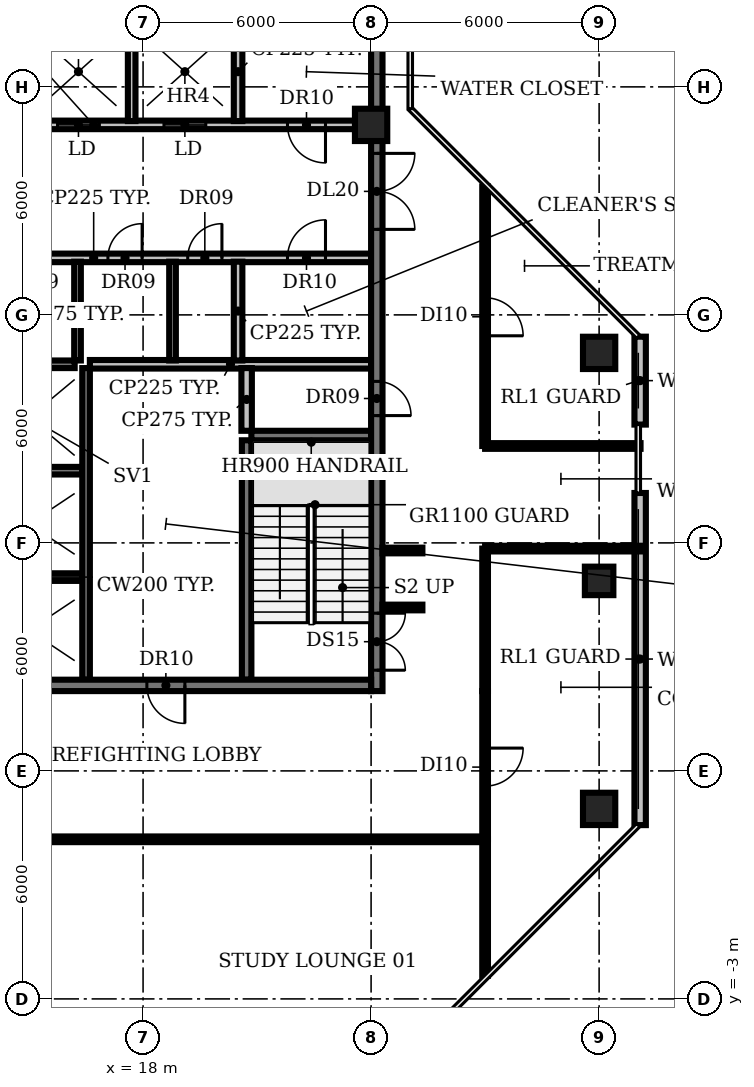
"""IFC4 building model, lengths in metres.
Left out: names, types, materials, properties, quantities, classifications, styles, units other than length and angle.
Written with IfcOpenShell. Run it as: python <this file> out.ifc"""

import sys

from ifc_helpers import new_model, si_unit, direction, frame, frame_2d, origin, origin_2d, place, context, subcontext, project, spatial, rectangle, circle, extrude, element, fill, save


model = new_model("IFC4")
c1 = context("Model", 3, precision=1e-05, world=origin(), true_north=direction((0.0, 1.0)))
c2 = subcontext(c1, "Body", "Model", "MODEL_VIEW")
j1 = project(units=[si_unit("LENGTHUNIT", "METRE"), si_unit("PLANEANGLEUNIT", "RADIAN")], contexts=[c1])
p1 = place(None, origin())
s1 = spatial("IfcSite", under=j1, at=p1, CompositionType="ELEMENT")
p2 = place(p1, origin())
s2 = spatial("IfcBuilding", under=s1, at=p2, CompositionType="ELEMENT")
p3 = place(p2, frame((0.0, 0.0, 281.0)))
s3 = spatial("IfcBuildingStorey", under=s2, at=p3, CompositionType="ELEMENT", Elevation=281.0)
for number, where, z_axis, x_axis in (
    (1, (24.0, 20.0, 0.0), (0.0, 0.0, 1.0), (1.0, 0.0, 0.0)),
    (2, (30.0, 2.0, 0.0), (0.0, 0.0, 1.0), (1.0, 0.0, 0.0)),
):
    element("IfcColumn", number, at=place(p3, frame(where, z_axis=z_axis, x_axis=x_axis)), inside=s3, PredefinedType="COLUMN", context=c2, shape_type="SweptSolid", body=[
        extrude(circle(Radius=0.425, at=origin_2d()), origin(), (0.0, 0.0, 1.0), 3.85),
    ])
p4 = place(p3, frame((30.0, 8.0, 0.0), z_axis=(0.0, 0.0, 1.0), x_axis=(1.0, 0.0, 0.0)))
e3 = element("IfcColumn", 3, at=p4, inside=s3, PredefinedType="COLUMN", context=c2, shape_type="SweptSolid", body=[
    extrude(rectangle(XDim=0.75, YDim=0.75, at=origin_2d()), origin(), (0.0, 0.0, 1.0), 3.85),
])
p5 = place(p3, frame((30.0, 14.0, 0.0), z_axis=(0.0, 0.0, 1.0), x_axis=(1.0, 0.0, 0.0)))
e4 = element("IfcColumn", 4, at=p5, inside=s3, PredefinedType="COLUMN", context=c2, shape_type="SweptSolid", body=[
    extrude(circle(Radius=0.425, at=origin_2d()), origin(), (0.0, 0.0, 1.0), 3.85),
])
p6 = place(p3, frame((31.08, 1.573, 0.0), z_axis=(0.0, 0.0, 1.0), x_axis=(0.0, 1.0, 0.0)))
e5 = element("IfcWall", 5, at=p6, inside=s3, PredefinedType="SOLIDWALL", context=c2, shape_type="SweptSolid", body=[
    extrude(rectangle(XDim=8.74, YDim=0.3, at=frame_2d((4.37, 0.0))), origin(), (0.0, 0.0, 1.0), 3.85),
])
p7 = place(p3, frame((31.08, 12.113, 0.0), z_axis=(0.0, 0.0, 1.0), x_axis=(0.0, 1.0, 0.0)))
e6 = element("IfcWall", 6, at=p7, inside=s3, PredefinedType="SOLIDWALL", context=c2, shape_type="SweptSolid", body=[
    extrude(rectangle(XDim=2.313, YDim=0.3, at=frame_2d((1.157, 0.0))), origin(), (0.0, 0.0, 1.0), 3.85),
])
for number, where, z_axis, x_axis in (
    (7, (13.6, 8.1, 0.0), (0.0, 0.0, 1.0), (1.0, 0.0, 0.0)),
    (8, (13.6, 10.9, 0.0), (0.0, 0.0, 1.0), (1.0, 0.0, 0.0)),
):
    element("IfcWall", number, at=place(p3, frame(where, z_axis=z_axis, x_axis=x_axis)), inside=s3, PredefinedType="SHEAR", context=c2, shape_type="SweptSolid", body=[
        extrude(rectangle(XDim=2.8, YDim=0.2, at=frame_2d((1.4, 0.0))), origin(), (0.0, 0.0, 1.0), 3.85),
    ])
p8 = place(p3, frame((20.85, 11.825, 0.0), z_axis=(0.0, 0.0, 1.0), x_axis=(1.0, 0.0, 0.0)))
e9 = element("IfcWall", 9, at=p8, inside=s3, PredefinedType="SHEAR", context=c2, shape_type="SweptSolid", body=[
    extrude(rectangle(XDim=3.15, YDim=0.25, at=frame_2d((1.575, 0.0))), origin(), (0.0, 0.0, 1.0), 3.85),
])
p9 = place(p3, frame((13.75, 13.7, 0.0), z_axis=(0.0, 0.0, 1.0), x_axis=(1.0, 0.0, 0.0)))
e10 = element("IfcWall", 10, at=p9, inside=s3, PredefinedType="SHEAR", context=c2, shape_type="SweptSolid", body=[
    extrude(rectangle(XDim=2.45, YDim=0.2, at=frame_2d((1.225, 0.0))), origin(), (0.0, 0.0, 1.0), 3.85),
])
p10 = place(p3, frame((16.6, 13.7, 0.0), z_axis=(0.0, 0.0, 1.0), x_axis=(1.0, 0.0, 0.0)))
e11 = element("IfcWall", 11, at=p10, inside=s3, PredefinedType="PARTITIONING", context=c2, shape_type="SweptSolid", body=[
    extrude(rectangle(XDim=7.4, YDim=0.225, at=frame_2d((3.7, 0.0))), origin(), (0.0, 0.0, 1.0), 3.85),
])
p11 = place(p3, frame((9.4, 16.5, 0.0), z_axis=(0.0, 0.0, 1.0), x_axis=(1.0, 0.0, 0.0)))
e12 = element("IfcWall", 12, at=p11, inside=s3, PredefinedType="PARTITIONING", context=c2, shape_type="SweptSolid", body=[
    extrude(rectangle(XDim=14.6, YDim=0.225, at=frame_2d((7.3, 0.0))), origin(), (0.0, 0.0, 1.0), 3.85),
])
p12 = place(p11, frame((1.6, 0.0, 0.0)))
e13 = element("IfcOpeningElement", 13, at=p12, cuts=e12, PredefinedType="OPENING", context=c2, shape_type="SweptSolid", body=[
    extrude(rectangle(XDim=1.0, YDim=2.1, at=frame_2d((0.5, 1.05))), frame((0.0, 0.123, 0.0), z_axis=(0.0, -1.0, 0.0), x_axis=(1.0, 0.0, 0.0)), (0.0, 0.0, 1.0), 0.245),
])
p13 = place(p11, frame((5.125, 0.0, 0.0)))
e14 = element("IfcOpeningElement", 14, at=p13, cuts=e12, PredefinedType="OPENING", context=c2, shape_type="SweptSolid", body=[
    extrude(rectangle(XDim=0.9, YDim=2.1, at=frame_2d((0.45, 1.05))), frame((0.0, 0.123, 0.0), z_axis=(0.0, -1.0, 0.0), x_axis=(1.0, 0.0, 0.0)), (0.0, 0.0, 1.0), 0.245),
])
p14 = place(p11, frame((7.675, 0.0, 0.0)))
e15 = element("IfcOpeningElement", 15, at=p14, cuts=e12, PredefinedType="OPENING", context=c2, shape_type="SweptSolid", body=[
    extrude(rectangle(XDim=0.9, YDim=2.1, at=frame_2d((0.45, 1.05))), frame((0.0, 0.123, 0.0), z_axis=(0.0, -1.0, 0.0), x_axis=(1.0, 0.0, 0.0)), (0.0, 0.0, 1.0), 0.245),
])
p15 = place(p11, frame((9.775, 0.0, 0.0)))
e16 = element("IfcOpeningElement", 16, at=p15, cuts=e12, PredefinedType="OPENING", context=c2, shape_type="SweptSolid", body=[
    extrude(rectangle(XDim=0.9, YDim=2.1, at=frame_2d((0.45, 1.05))), frame((0.0, 0.123, 0.0), z_axis=(0.0, -1.0, 0.0), x_axis=(1.0, 0.0, 0.0)), (0.0, 0.0, 1.0), 0.245),
])
p16 = place(p11, frame((12.4, 0.0, 0.0)))
e17 = element("IfcOpeningElement", 17, at=p16, cuts=e12, PredefinedType="OPENING", context=c2, shape_type="SweptSolid", body=[
    extrude(rectangle(XDim=1.0, YDim=2.1, at=frame_2d((0.5, 1.05))), frame((0.0, 0.123, 0.0), z_axis=(0.0, -1.0, 0.0), x_axis=(1.0, 0.0, 0.0)), (0.0, 0.0, 1.0), 0.245),
])
p17 = place(p3, frame((24.0, 20.0, 0.0), z_axis=(0.0, 0.0, 1.0), x_axis=(-1.0, 0.0, 0.0)))
e18 = element("IfcWall", 18, at=p17, inside=s3, PredefinedType="PARTITIONING", context=c2, shape_type="SweptSolid", body=[
    extrude(rectangle(XDim=14.6, YDim=0.225, at=frame_2d((7.3, 0.0))), origin(), (0.0, 0.0, 1.0), 3.85),
])
p18 = place(p17, frame((12.75, 0.0, 0.0)))
e19 = element("IfcOpeningElement", 19, at=p18, cuts=e18, PredefinedType="OPENING", context=c2, shape_type="SweptSolid", body=[
    extrude(rectangle(XDim=1.1, YDim=2.1, at=frame_2d((0.55, 1.05))), frame((0.0, 0.123, 0.0), z_axis=(0.0, -1.0, 0.0), x_axis=(1.0, 0.0, 0.0)), (0.0, 0.0, 1.0), 0.245),
])
p19 = place(p17, frame((9.95, 0.0, 0.0)))
e20 = element("IfcOpeningElement", 20, at=p19, cuts=e18, PredefinedType="OPENING", context=c2, shape_type="SweptSolid", body=[
    extrude(rectangle(XDim=1.1, YDim=2.1, at=frame_2d((0.55, 1.05))), frame((0.0, 0.123, 0.0), z_axis=(0.0, -1.0, 0.0), x_axis=(1.0, 0.0, 0.0)), (0.0, 0.0, 1.0), 0.245),
])
p20 = place(p17, frame((7.15, 0.0, 0.0)))
e21 = element("IfcOpeningElement", 21, at=p20, cuts=e18, PredefinedType="OPENING", context=c2, shape_type="SweptSolid", body=[
    extrude(rectangle(XDim=1.1, YDim=2.1, at=frame_2d((0.55, 1.05))), frame((0.0, 0.123, 0.0), z_axis=(0.0, -1.0, 0.0), x_axis=(1.0, 0.0, 0.0)), (0.0, 0.0, 1.0), 0.245),
])
p21 = place(p17, frame((4.35, 0.0, 0.0)))
e22 = element("IfcOpeningElement", 22, at=p21, cuts=e18, PredefinedType="OPENING", context=c2, shape_type="SweptSolid", body=[
    extrude(rectangle(XDim=1.1, YDim=2.1, at=frame_2d((0.55, 1.05))), frame((0.0, 0.123, 0.0), z_axis=(0.0, -1.0, 0.0), x_axis=(1.0, 0.0, 0.0)), (0.0, 0.0, 1.0), 0.245),
])
p22 = place(p17, frame((1.2, 0.0, 0.0)))
e23 = element("IfcOpeningElement", 23, at=p22, cuts=e18, PredefinedType="OPENING", context=c2, shape_type="SweptSolid", body=[
    extrude(rectangle(XDim=1.0, YDim=2.1, at=frame_2d((0.5, 1.05))), frame((0.0, 0.123, 0.0), z_axis=(0.0, -1.0, 0.0), x_axis=(1.0, 0.0, 0.0)), (0.0, 0.0, 1.0), 0.245),
])
p23 = place(p3, frame((16.275, 13.8, 0.0), z_axis=(0.0, 0.0, 1.0), x_axis=(0.0, 1.0, 0.0)))
e24 = element("IfcWall", 24, at=p23, inside=s3, PredefinedType="PARTITIONING", context=c2, shape_type="SweptSolid", body=[
    extrude(rectangle(XDim=2.6, YDim=0.175, at=frame_2d((1.3, 0.0))), origin(), (0.0, 0.0, 1.0), 3.85),
])
p24 = place(p3, frame((16.5, 5.4, 0.0), z_axis=(0.0, 0.0, 1.0), x_axis=(0.0, 1.0, 0.0)))
e25 = element("IfcWall", 25, at=p24, inside=s3, PredefinedType="SHEAR", context=c2, shape_type="SweptSolid", body=[
    extrude(rectangle(XDim=8.2, YDim=0.2, at=frame_2d((4.1, 0.0))), origin(), (0.0, 0.0, 1.0), 3.85),
])
p25 = place(p3, frame((17.7, 20.1, 0.0), z_axis=(0.0, 0.0, 1.0), x_axis=(0.0, 1.0, 0.0)))
e26 = element("IfcWall", 26, at=p25, inside=s3, PredefinedType="SOLIDWALL", context=c2, shape_type="SweptSolid", body=[
    extrude(rectangle(XDim=2.6, YDim=0.2, at=frame_2d((1.3, 0.0))), origin(), (0.0, 0.0, 1.0), 3.85),
])
p26 = place(p3, frame((18.775, 13.8, 0.0), z_axis=(0.0, 0.0, 1.0), x_axis=(0.0, 1.0, 0.0)))
e27 = element("IfcWall", 27, at=p26, inside=s3, PredefinedType="PARTITIONING", context=c2, shape_type="SweptSolid", body=[
    extrude(rectangle(XDim=2.6, YDim=0.175, at=frame_2d((1.3, 0.0))), origin(), (0.0, 0.0, 1.0), 3.85),
])
for number, where, z_axis, x_axis in (
    (28, (20.5, 13.8, 0.0), (0.0, 0.0, 1.0), (0.0, 1.0, 0.0)),
    (29, (20.5, 20.1, 0.0), (0.0, 0.0, 1.0), (0.0, 1.0, 0.0)),
):
    element("IfcWall", number, at=place(p3, frame(where, z_axis=z_axis, x_axis=x_axis)), inside=s3, PredefinedType="PARTITIONING", context=c2, shape_type="SweptSolid", body=[
        extrude(rectangle(XDim=2.6, YDim=0.225, at=frame_2d((1.3, 0.0))), origin(), (0.0, 0.0, 1.0), 3.85),
    ])
p27 = place(p3, frame((20.725, 5.4, 0.0), z_axis=(0.0, 0.0, 1.0), x_axis=(0.0, 1.0, 0.0)))
e30 = element("IfcWall", 30, at=p27, inside=s3, PredefinedType="SHEAR", context=c2, shape_type="SweptSolid", body=[
    extrude(rectangle(XDim=6.3, YDim=0.25, at=frame_2d((3.15, 0.0))), origin(), (0.0, 0.0, 1.0), 3.85),
])
p28 = place(p3, frame((20.725, 11.95, 0.0), z_axis=(0.0, 0.0, 1.0), x_axis=(0.0, 1.0, 0.0)))
e31 = element("IfcWall", 31, at=p28, inside=s3, PredefinedType="PARTITIONING", context=c2, shape_type="SweptSolid", body=[
    extrude(rectangle(XDim=1.65, YDim=0.275, at=frame_2d((0.825, 0.0))), origin(), (0.0, 0.0, 1.0), 3.85),
])
p29 = place(p3, frame((24.15, 25.655, 0.0), z_axis=(0.0, 0.0, 1.0), x_axis=(0.0, -1.0, 0.0)))
e32 = element("IfcWall", 32, at=p29, inside=s3, PredefinedType="SHEAR", context=c2, shape_type="SweptSolid", body=[
    extrude(rectangle(XDim=20.555, YDim=0.3, at=frame_2d((10.277, 0.0))), origin(), (0.0, 0.0, 1.0), 3.85),
])
p30 = place(p29, frame((18.505, 0.0, 0.0)))
e33 = element("IfcOpeningElement", 33, at=p30, cuts=e32, PredefinedType="OPENING", context=c2, shape_type="SweptSolid", body=[
    extrude(rectangle(XDim=1.5, YDim=2.1, at=frame_2d((0.75, 1.05))), frame((0.0, 0.16, 0.0), z_axis=(0.0, -1.0, 0.0), x_axis=(1.0, 0.0, 0.0)), (0.0, 0.0, 1.0), 0.32),
])
p31 = place(p29, frame((12.405, 0.0, 0.0)))
e34 = element("IfcOpeningElement", 34, at=p31, cuts=e32, PredefinedType="OPENING", context=c2, shape_type="SweptSolid", body=[
    extrude(rectangle(XDim=0.9, YDim=2.1, at=frame_2d((0.45, 1.05))), frame((0.0, 0.16, 0.0), z_axis=(0.0, -1.0, 0.0), x_axis=(1.0, 0.0, 0.0)), (0.0, 0.0, 1.0), 0.32),
])
p32 = place(p29, frame((6.405, 0.0, 0.0)))
e35 = element("IfcOpeningElement", 35, at=p32, cuts=e32, PredefinedType="OPENING", context=c2, shape_type="SweptSolid", body=[
    extrude(rectangle(XDim=2.0, YDim=2.1, at=frame_2d((1.0, 1.05))), frame((0.0, 0.16, 0.0), z_axis=(0.0, -1.0, 0.0), x_axis=(1.0, 0.0, 0.0)), (0.0, 0.0, 1.0), 0.32),
])
p33 = place(p3, frame((24.0, 5.25, 0.0), z_axis=(0.0, 0.0, 1.0), x_axis=(-1.0, 0.0, 0.0)))
e36 = element("IfcWall", 36, at=p33, inside=s3, PredefinedType="SHEAR", context=c2, shape_type="SweptSolid", body=[
    extrude(rectangle(XDim=18.0, YDim=0.3, at=frame_2d((9.0, 0.0))), origin(), (0.0, 0.0, 1.0), 3.85),
])
p34 = place(p33, frame((13.0, 0.0, 0.0)))
e37 = element("IfcOpeningElement", 37, at=p34, cuts=e36, PredefinedType="OPENING", context=c2, shape_type="SweptSolid", body=[
    extrude(rectangle(XDim=1.2, YDim=2.1, at=frame_2d((0.6, 1.05))), frame((0.0, 0.16, 0.0), z_axis=(0.0, -1.0, 0.0), x_axis=(1.0, 0.0, 0.0)), (0.0, 0.0, 1.0), 0.32),
])
p35 = place(p33, frame((4.9, 0.0, 0.0)))
e38 = element("IfcOpeningElement", 38, at=p35, cuts=e36, PredefinedType="OPENING", context=c2, shape_type="SweptSolid", body=[
    extrude(rectangle(XDim=1.0, YDim=2.1, at=frame_2d((0.5, 1.05))), frame((0.0, 0.16, 0.0), z_axis=(0.0, -1.0, 0.0), x_axis=(1.0, 0.0, 0.0)), (0.0, 0.0, 1.0), 0.32),
])
for number, where, z_axis, x_axis in (
    (39, (24.3, 7.3, 0.0), (0.0, 0.0, 1.0), (1.0, 0.0, 0.0)),
    (40, (24.3, 8.8, 0.0), (0.0, 0.0, 1.0), (1.0, 0.0, 0.0)),
):
    element("IfcWall", number, at=place(p3, frame(where, z_axis=z_axis, x_axis=x_axis)), inside=s3, PredefinedType="PARTITIONING", context=c2, shape_type="SweptSolid", body=[
        extrude(rectangle(XDim=1.05, YDim=0.15, at=frame_2d((0.525, 0.0))), origin(), (0.0, 0.0, 1.0), 2.9),
    ])
p36 = place(p3, frame((27.0, -2.39, 0.0), z_axis=(0.0, 0.0, 1.0), x_axis=(0.0, 1.0, 0.0)))
e41 = element("IfcWall", 41, at=p36, inside=s3, PredefinedType="PARTITIONING", context=c2, shape_type="SweptSolid", body=[
    extrude(rectangle(XDim=3.59, YDim=0.15, at=frame_2d((1.795, 0.0))), origin(), (0.0, 0.0, 1.0), 2.9),
])
p37 = place(p3, frame((27.0, 1.2, 0.0), z_axis=(0.0, 0.0, 1.0), x_axis=(-1.0, 0.0, 0.0)))
e42 = element("IfcWall", 42, at=p37, inside=s3, PredefinedType="PARTITIONING", context=c2, shape_type="SweptSolid", body=[
    extrude(rectangle(XDim=24.0, YDim=0.15, at=frame_2d((12.0, 0.0))), origin(), (0.0, 0.0, 1.0), 2.9),
])
p38 = place(p37, frame((11.5, 0.0, 0.0)))
e43 = element("IfcOpeningElement", 43, at=p38, cuts=e42, PredefinedType="OPENING", context=c2, shape_type="SweptSolid", body=[
    extrude(rectangle(XDim=1.2, YDim=2.1, at=frame_2d((0.6, 1.05))), frame((0.0, 0.085, 0.0), z_axis=(0.0, -1.0, 0.0), x_axis=(1.0, 0.0, 0.0)), (0.0, 0.0, 1.0), 0.17),
])
p39 = place(p3, frame((27.0, 5.1, 0.0), z_axis=(0.0, 0.0, 1.0), x_axis=(0.0, -1.0, 0.0)))
e44 = element("IfcWall", 44, at=p39, inside=s3, PredefinedType="PARTITIONING", context=c2, shape_type="SweptSolid", body=[
    extrude(rectangle(XDim=3.9, YDim=0.15, at=frame_2d((1.95, 0.0))), origin(), (0.0, 0.0, 1.0), 2.9),
])
p40 = place(p39, frame((1.5, 0.0, 0.0)))
e45 = element("IfcOpeningElement", 45, at=p40, cuts=e44, PredefinedType="OPENING", context=c2, shape_type="SweptSolid", body=[
    extrude(rectangle(XDim=1.0, YDim=2.1, at=frame_2d((0.5, 1.05))), frame((0.0, 0.085, 0.0), z_axis=(0.0, -1.0, 0.0), x_axis=(1.0, 0.0, 0.0)), (0.0, 0.0, 1.0), 0.17),
])
p41 = place(p3, frame((27.0, 5.1, 0.0), z_axis=(0.0, 0.0, 1.0), x_axis=(0.0, 1.0, 0.0)))
e46 = element("IfcWall", 46, at=p41, inside=s3, PredefinedType="PARTITIONING", context=c2, shape_type="SweptSolid", body=[
    extrude(rectangle(XDim=3.75, YDim=0.15, at=frame_2d((1.875, 0.0))), origin(), (0.0, 0.0, 1.0), 2.9),
])
for number, where, z_axis, x_axis in (
    (47, (27.0, 8.85, 0.0), (0.0, 0.0, 1.0), (1.0, 0.0, 0.0)),
    (48, (27.0, 11.55, 0.0), (0.0, 0.0, 1.0), (1.0, 0.0, 0.0)),
):
    element("IfcWall", number, at=place(p3, frame(where, z_axis=z_axis, x_axis=x_axis)), inside=s3, PredefinedType="PARTITIONING", context=c2, shape_type="SweptSolid", body=[
        extrude(rectangle(XDim=4.09, YDim=0.15, at=frame_2d((2.045, 0.0))), origin(), (0.0, 0.0, 1.0), 2.9),
    ])
p42 = place(p3, frame((27.0, 18.38, 0.0), z_axis=(0.0, 0.0, 1.0), x_axis=(0.0, -1.0, 0.0)))
e49 = element("IfcWall", 49, at=p42, inside=s3, PredefinedType="PARTITIONING", context=c2, shape_type="SweptSolid", body=[
    extrude(rectangle(XDim=6.83, YDim=0.15, at=frame_2d((3.415, 0.0))), origin(), (0.0, 0.0, 1.0), 2.9),
])
p43 = place(p42, frame((2.93, 0.0, 0.0)))
e50 = element("IfcOpeningElement", 50, at=p43, cuts=e49, PredefinedType="OPENING", context=c2, shape_type="SweptSolid", body=[
    extrude(rectangle(XDim=1.0, YDim=2.1, at=frame_2d((0.5, 1.05))), frame((0.0, 0.085, 0.0), z_axis=(0.0, -1.0, 0.0), x_axis=(1.0, 0.0, 0.0)), (0.0, 0.0, 1.0), 0.17),
])
p44 = place(p14, origin())
e51 = element("IfcDoor", 51, at=p44, inside=s3, OperationType="SINGLE_SWING_RIGHT", PredefinedType="DOOR", context=c2, shape_type="SweptSolid", body=[
    extrude(rectangle(XDim=0.9, YDim=2.1, at=frame_2d((0.45, 1.05))), frame((0.0, 0.025, 0.0), z_axis=(0.0, -1.0, 0.0), x_axis=(1.0, 0.0, 0.0)), (0.0, 0.0, 1.0), 0.05),
])
fill(e15, e51)
p45 = place(p15, origin())
e52 = element("IfcDoor", 52, at=p45, inside=s3, OperationType="SINGLE_SWING_RIGHT", PredefinedType="DOOR", context=c2, shape_type="SweptSolid", body=[
    extrude(rectangle(XDim=0.9, YDim=2.1, at=frame_2d((0.45, 1.05))), frame((0.0, 0.025, 0.0), z_axis=(0.0, -1.0, 0.0), x_axis=(1.0, 0.0, 0.0)), (0.0, 0.0, 1.0), 0.05),
])
fill(e16, e52)
p46 = place(p16, origin())
e53 = element("IfcDoor", 53, at=p46, inside=s3, OperationType="SINGLE_SWING_RIGHT", PredefinedType="DOOR", context=c2, shape_type="SweptSolid", body=[
    extrude(rectangle(XDim=1.0, YDim=2.1, at=frame_2d((0.5, 1.05))), frame((0.0, 0.025, 0.0), z_axis=(0.0, -1.0, 0.0), x_axis=(1.0, 0.0, 0.0)), (0.0, 0.0, 1.0), 0.05),
])
fill(e17, e53)
p47 = place(p20, origin())
e54 = element("IfcDoor", 54, at=p47, inside=s3, OperationType="DOUBLE_DOOR_SLIDING", PredefinedType="DOOR", context=c2, shape_type="SweptSolid", body=[
    extrude(rectangle(XDim=1.1, YDim=2.1, at=frame_2d((0.55, 1.05))), frame((0.0, 0.025, 0.0), z_axis=(0.0, -1.0, 0.0), x_axis=(1.0, 0.0, 0.0)), (0.0, 0.0, 1.0), 0.05),
])
fill(e21, e54)
p48 = place(p21, origin())
e55 = element("IfcDoor", 55, at=p48, inside=s3, OperationType="DOUBLE_DOOR_SLIDING", PredefinedType="DOOR", context=c2, shape_type="SweptSolid", body=[
    extrude(rectangle(XDim=1.1, YDim=2.1, at=frame_2d((0.55, 1.05))), frame((0.0, 0.025, 0.0), z_axis=(0.0, -1.0, 0.0), x_axis=(1.0, 0.0, 0.0)), (0.0, 0.0, 1.0), 0.05),
])
fill(e22, e55)
p49 = place(p22, origin())
e56 = element("IfcDoor", 56, at=p49, inside=s3, OperationType="SINGLE_SWING_LEFT", PredefinedType="DOOR", context=c2, shape_type="SweptSolid", body=[
    extrude(rectangle(XDim=1.0, YDim=2.1, at=frame_2d((0.5, 1.05))), frame((0.0, 0.025, 0.0), z_axis=(0.0, -1.0, 0.0), x_axis=(1.0, 0.0, 0.0)), (0.0, 0.0, 1.0), 0.05),
])
fill(e23, e56)
p50 = place(p30, origin())
e57 = element("IfcDoor", 57, at=p50, inside=s3, OperationType="DOUBLE_DOOR_SINGLE_SWING", PredefinedType="DOOR", context=c2, shape_type="SweptSolid", body=[
    extrude(rectangle(XDim=1.5, YDim=2.1, at=frame_2d((0.75, 1.05))), frame((0.0, 0.025, 0.0), z_axis=(0.0, -1.0, 0.0), x_axis=(1.0, 0.0, 0.0)), (0.0, 0.0, 1.0), 0.05),
])
fill(e33, e57)
p51 = place(p31, origin())
e58 = element("IfcDoor", 58, at=p51, inside=s3, OperationType="SINGLE_SWING_RIGHT", PredefinedType="DOOR", context=c2, shape_type="SweptSolid", body=[
    extrude(rectangle(XDim=0.9, YDim=2.1, at=frame_2d((0.45, 1.05))), frame((0.0, 0.025, 0.0), z_axis=(0.0, -1.0, 0.0), x_axis=(1.0, 0.0, 0.0)), (0.0, 0.0, 1.0), 0.05),
])
fill(e34, e58)
p52 = place(p32, origin())
e59 = element("IfcDoor", 59, at=p52, inside=s3, OperationType="DOUBLE_DOOR_SINGLE_SWING", PredefinedType="DOOR", context=c2, shape_type="SweptSolid", body=[
    extrude(rectangle(XDim=2.0, YDim=2.1, at=frame_2d((1.0, 1.05))), frame((0.0, 0.025, 0.0), z_axis=(0.0, -1.0, 0.0), x_axis=(1.0, 0.0, 0.0)), (0.0, 0.0, 1.0), 0.05),
])
fill(e35, e59)
p53 = place(p35, origin())
e60 = element("IfcDoor", 60, at=p53, inside=s3, OperationType="SINGLE_SWING_LEFT", PredefinedType="DOOR", context=c2, shape_type="SweptSolid", body=[
    extrude(rectangle(XDim=1.0, YDim=2.1, at=frame_2d((0.5, 1.05))), frame((0.0, 0.025, 0.0), z_axis=(0.0, -1.0, 0.0), x_axis=(1.0, 0.0, 0.0)), (0.0, 0.0, 1.0), 0.05),
])
fill(e38, e60)
p54 = place(p40, origin())
e61 = element("IfcDoor", 61, at=p54, inside=s3, OperationType="SINGLE_SWING_LEFT", PredefinedType="DOOR", context=c2, shape_type="SweptSolid", body=[
    extrude(rectangle(XDim=1.0, YDim=2.1, at=frame_2d((0.5, 1.05))), frame((0.0, 0.025, 0.0), z_axis=(0.0, -1.0, 0.0), x_axis=(1.0, 0.0, 0.0)), (0.0, 0.0, 1.0), 0.05),
])
fill(e45, e61)
p55 = place(p43, origin())
e62 = element("IfcDoor", 62, at=p55, inside=s3, OperationType="SINGLE_SWING_RIGHT", PredefinedType="DOOR", context=c2, shape_type="SweptSolid", body=[
    extrude(rectangle(XDim=1.0, YDim=2.1, at=frame_2d((0.5, 1.05))), frame((0.0, 0.025, 0.0), z_axis=(0.0, -1.0, 0.0), x_axis=(1.0, 0.0, 0.0)), (0.0, 0.0, 1.0), 0.05),
])
fill(e50, e62)
save(model, sys.argv[1])
